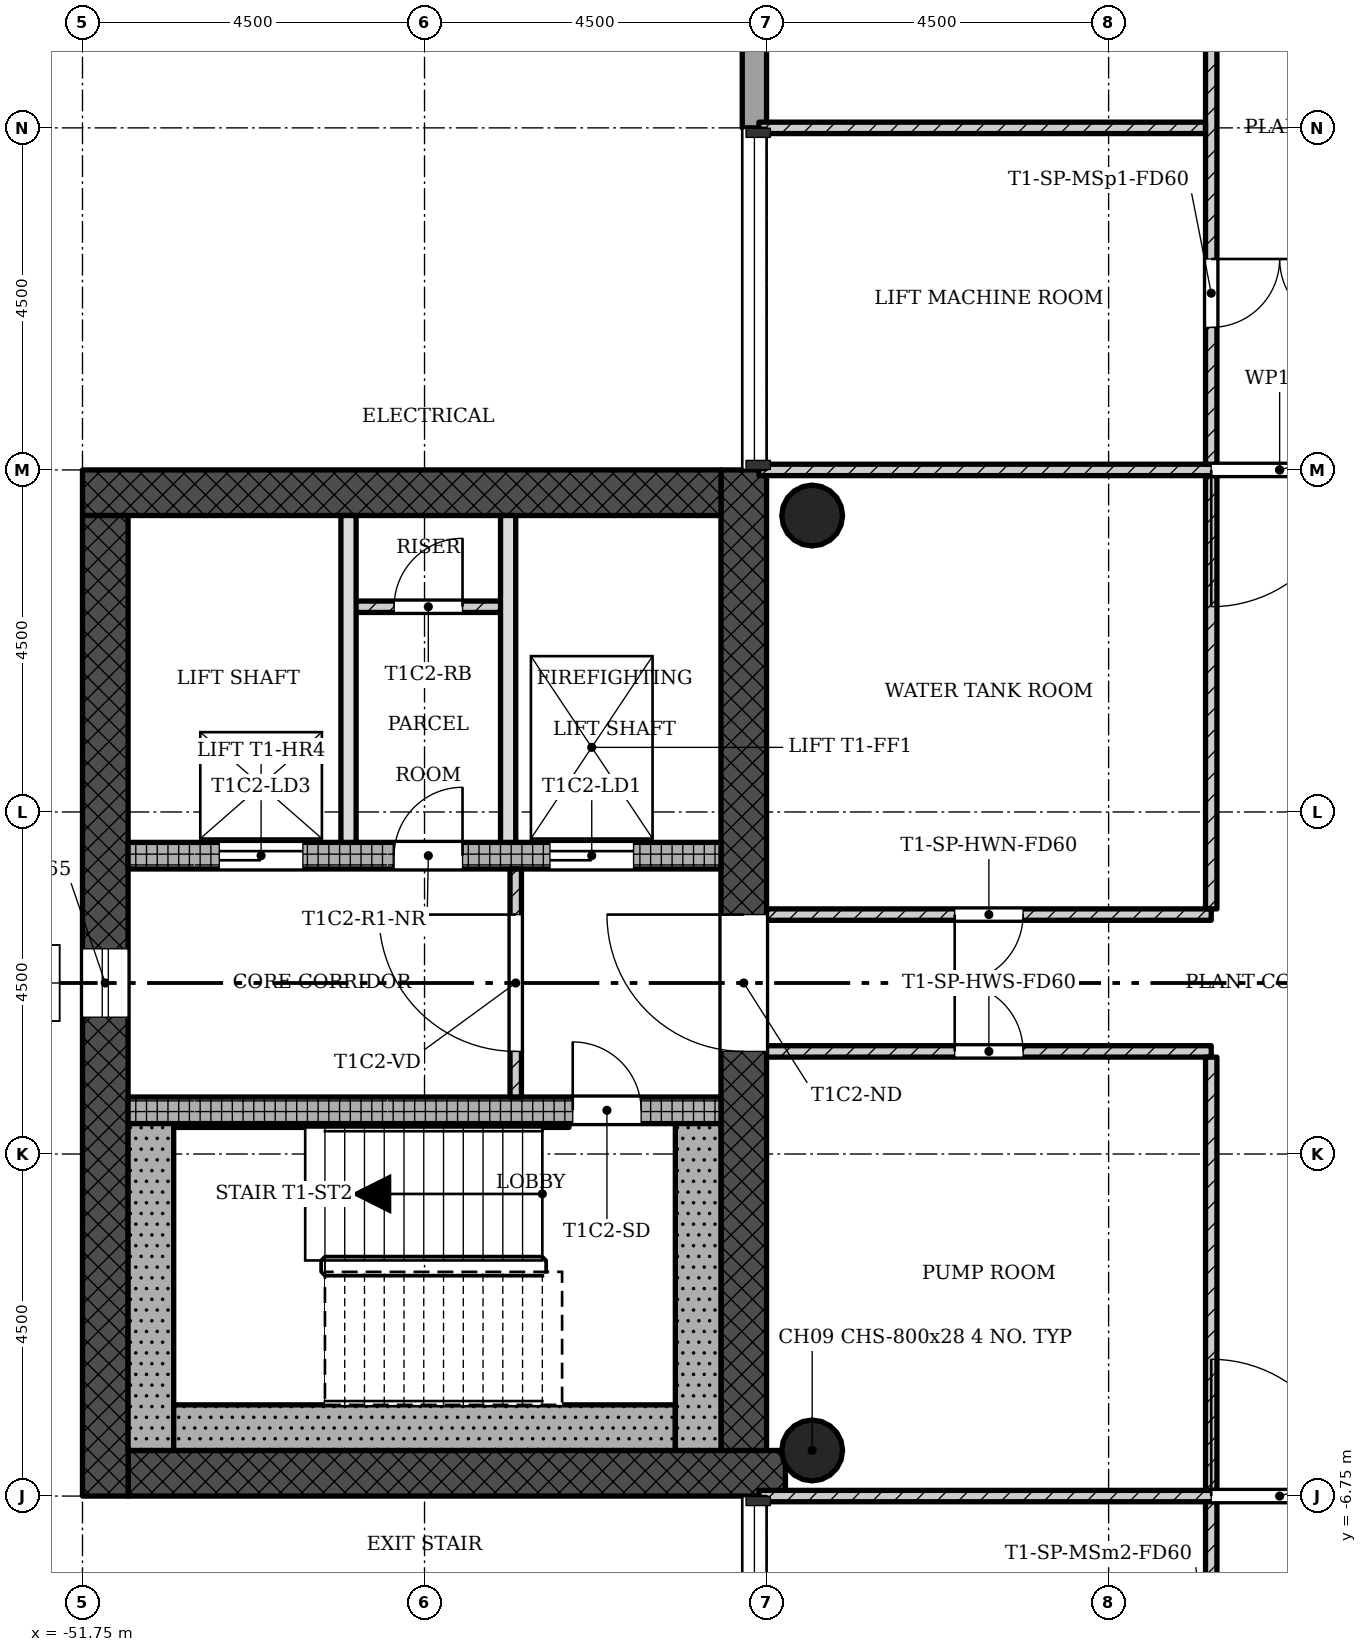
"""IFC4 building model, lengths in metres.
Left out: names, types, materials, properties, quantities, classifications, styles, units other than length and angle.
Written with IfcOpenShell. Run it as: python <this file> out.ifc"""

import sys

from ifc_helpers import new_model, si_unit, direction, frame, frame_2d, origin, origin_2d, place, context, subcontext, project, spatial, rectangle, hollow_circle, extrude, element, fill, save


model = new_model("IFC4")
c1 = context("Model", 3, precision=1e-05, world=origin(), true_north=direction((0.0, 1.0)))
c2 = subcontext(c1, "Body", "Model", "MODEL_VIEW")
j1 = project(units=[si_unit("LENGTHUNIT", "METRE"), si_unit("PLANEANGLEUNIT", "RADIAN")], contexts=[c1])
p1 = place(None, origin())
s1 = spatial("IfcSite", under=j1, at=p1, CompositionType="ELEMENT")
p2 = place(p1, origin())
s2 = spatial("IfcBuilding", under=s1, at=p2, CompositionType="ELEMENT")
p3 = place(p2, frame((0.0, 0.0, 233.4)))
s3 = spatial("IfcBuildingStorey", under=s2, at=p3, CompositionType="ELEMENT", Elevation=233.4)
p4 = place(p3, frame((-51.15, -6.45, 0.0), z_axis=(0.0, 0.0, 1.0), x_axis=(1.0, 0.0, 0.0)))
e1 = element("IfcWall", 1, at=p4, inside=s3, PredefinedType="SHEAR", context=c2, shape_type="SweptSolid", body=[
    extrude(rectangle(XDim=8.648, YDim=0.6, at=frame_2d((4.324, 0.0))), origin(), (0.0, 0.0, 1.0), 4.5),
])
p5 = place(p3, frame((-43.05, -6.15, 0.0), z_axis=(0.0, 0.0, 1.0), x_axis=(0.0, 1.0, 0.0)))
e2 = element("IfcWall", 2, at=p5, inside=s3, PredefinedType="SHEAR", context=c2, shape_type="SweptSolid", body=[
    extrude(rectangle(XDim=12.9, YDim=0.6, at=frame_2d((6.45, 0.0))), origin(), (0.0, 0.0, 1.0), 4.5),
])
p6 = place(p5, frame((5.25, 0.0, 0.0)))
e3 = element("IfcOpeningElement", 3, at=p6, cuts=e2, PredefinedType="OPENING", context=c2, shape_type="SweptSolid", body=[
    extrude(rectangle(XDim=1.8, YDim=2.1, at=frame_2d((0.9, 1.05))), frame((0.0, 0.31, 0.0), z_axis=(0.0, -1.0, 0.0), x_axis=(1.0, 0.0, 0.0)), (0.0, 0.0, 1.0), 0.62),
])
p7 = place(p3, frame((-43.35, 6.45, 0.0), z_axis=(0.0, 0.0, 1.0), x_axis=(-1.0, 0.0, 0.0)))
e4 = element("IfcWall", 4, at=p7, inside=s3, PredefinedType="SHEAR", context=c2, shape_type="SweptSolid", body=[
    extrude(rectangle(XDim=8.4, YDim=0.6, at=frame_2d((4.2, 0.0))), origin(), (0.0, 0.0, 1.0), 4.5),
])
p8 = place(p3, frame((-51.45, 6.15, 0.0), z_axis=(0.0, 0.0, 1.0), x_axis=(0.0, -1.0, 0.0)))
e5 = element("IfcWall", 5, at=p8, inside=s3, PredefinedType="SHEAR", context=c2, shape_type="SweptSolid", body=[
    extrude(rectangle(XDim=12.9, YDim=0.6, at=frame_2d((6.45, 0.0))), origin(), (0.0, 0.0, 1.0), 4.5),
])
p9 = place(p8, frame((5.7, 0.0, 0.45)))
e6 = element("IfcOpeningElement", 6, at=p9, cuts=e5, PredefinedType="OPENING", context=c2, shape_type="SweptSolid", body=[
    extrude(rectangle(XDim=0.9, YDim=2.4, at=frame_2d((0.45, 1.2))), frame((0.0, 0.31, 0.0), z_axis=(0.0, -1.0, 0.0), x_axis=(1.0, 0.0, 0.0)), (0.0, 0.0, 1.0), 0.62),
])
p10 = place(p3, frame((-51.15, -1.675, 0.0), z_axis=(0.0, 0.0, 1.0), x_axis=(1.0, 0.0, 0.0)))
e7 = element("IfcWall", 7, at=p10, inside=s3, PredefinedType="SHEAR", context=c2, shape_type="SweptSolid", body=[
    extrude(rectangle(XDim=7.8, YDim=0.35, at=frame_2d((3.9, 0.0))), origin(), (0.0, 0.0, 1.0), 4.5),
])
p11 = place(p10, frame((5.85, 0.0, 0.0)))
e8 = element("IfcOpeningElement", 8, at=p11, cuts=e7, PredefinedType="OPENING", context=c2, shape_type="SweptSolid", body=[
    extrude(rectangle(XDim=0.9, YDim=2.1, at=frame_2d((0.45, 1.05))), frame((0.0, 0.185, 0.0), z_axis=(0.0, -1.0, 0.0), x_axis=(1.0, 0.0, 0.0)), (0.0, 0.0, 1.0), 0.37),
])
p12 = place(p3, frame((-51.15, 1.675, 0.0), z_axis=(0.0, 0.0, 1.0), x_axis=(1.0, 0.0, 0.0)))
e9 = element("IfcWall", 9, at=p12, inside=s3, PredefinedType="SHEAR", context=c2, shape_type="SweptSolid", body=[
    extrude(rectangle(XDim=7.8, YDim=0.35, at=frame_2d((3.9, 0.0))), origin(), (0.0, 0.0, 1.0), 4.5),
])
p13 = place(p12, frame((5.55, 0.0, 0.0)))
e10 = element("IfcOpeningElement", 10, at=p13, cuts=e9, PredefinedType="OPENING", context=c2, shape_type="SweptSolid", body=[
    extrude(rectangle(XDim=1.1, YDim=2.1, at=frame_2d((0.55, 1.05))), frame((0.0, 0.185, 0.0), z_axis=(0.0, -1.0, 0.0), x_axis=(1.0, 0.0, 0.0)), (0.0, 0.0, 1.0), 0.37),
])
p14 = place(p12, frame((1.2, 0.0, 0.0)))
e11 = element("IfcOpeningElement", 11, at=p14, cuts=e9, PredefinedType="OPENING", context=c2, shape_type="SweptSolid", body=[
    extrude(rectangle(XDim=1.1, YDim=2.1, at=frame_2d((0.55, 1.05))), frame((0.0, 0.185, 0.0), z_axis=(0.0, -1.0, 0.0), x_axis=(1.0, 0.0, 0.0)), (0.0, 0.0, 1.0), 0.37),
])
p15 = place(p12, frame((3.5, 0.0, 0.0)))
e12 = element("IfcOpeningElement", 12, at=p15, cuts=e9, PredefinedType="OPENING", context=c2, shape_type="SweptSolid", body=[
    extrude(rectangle(XDim=0.9, YDim=2.1, at=frame_2d((0.45, 1.05))), frame((0.0, 0.185, 0.0), z_axis=(0.0, -1.0, 0.0), x_axis=(1.0, 0.0, 0.0)), (0.0, 0.0, 1.0), 0.37),
])
for number, where, z_axis, x_axis in (
    (13, (-42.15, -6.15, 0.0), (0.0, 0.0, 1.0), (1.0, 0.0, 0.0)),
    (14, (-42.15, 6.15, 0.0), (0.0, 0.0, 1.0), (1.0, 0.0, 0.0)),
):
    element("IfcColumn", number, at=place(p3, frame(where, z_axis=z_axis, x_axis=x_axis)), inside=s3, PredefinedType="COLUMN", context=c2, shape_type="SweptSolid", body=[
        extrude(hollow_circle(Radius=0.4, WallThickness=0.028, at=origin_2d()), origin(), (0.0, 0.0, 1.0), 4.5),
    ])
p16 = place(p3, frame((-42.91, 12.75, -0.3), z_axis=(0.0, 0.0, 1.0), x_axis=(0.0, -1.0, 0.0)))
e15 = element("IfcWall", 15, at=p16, inside=s3, PredefinedType="STANDARD", context=c2, shape_type="SweptSolid", body=[
    extrude(rectangle(XDim=1.5, YDim=0.32, at=frame_2d((0.75, 0.0))), origin(), (0.0, 0.0, 1.0), 4.5),
])
p17 = place(p3, frame((-46.05, 1.5, 0.0), z_axis=(0.0, 0.0, 1.0), x_axis=(0.0, -1.0, 0.0)))
e16 = element("IfcWall", 16, at=p17, inside=s3, PredefinedType="PARTITIONING", context=c2, shape_type="SweptSolid", body=[
    extrude(rectangle(XDim=3.0, YDim=0.15, at=frame_2d((1.5, 0.0))), origin(), (0.0, 0.0, 1.0), 4.1),
])
p18 = place(p17, frame((0.6, 0.0, 0.0)))
e17 = element("IfcOpeningElement", 17, at=p18, cuts=e16, PredefinedType="OPENING", context=c2, shape_type="SweptSolid", body=[
    extrude(rectangle(XDim=1.8, YDim=2.1, at=frame_2d((0.9, 1.05))), frame((0.0, 0.085, 0.0), z_axis=(0.0, -1.0, 0.0), x_axis=(1.0, 0.0, 0.0)), (0.0, 0.0, 1.0), 0.17),
])
for number, where, z_axis, x_axis in (
    (18, (-48.25, 6.15, 0.0), (0.0, 0.0, 1.0), (0.0, -1.0, 0.0)),
    (19, (-46.15, 6.15, 0.0), (0.0, 0.0, 1.0), (0.0, -1.0, 0.0)),
):
    element("IfcWall", number, at=place(p3, frame(where, z_axis=z_axis, x_axis=x_axis)), inside=s3, PredefinedType="SOLIDWALL", context=c2, shape_type="SweptSolid", body=[
        extrude(rectangle(XDim=4.3, YDim=0.2, at=frame_2d((2.15, 0.0))), origin(), (0.0, 0.0, 1.0), 4.1),
    ])
p19 = place(p3, frame((-46.15, 4.95, 0.0), z_axis=(0.0, 0.0, 1.0), x_axis=(-1.0, 0.0, 0.0)))
e20 = element("IfcWall", 20, at=p19, inside=s3, PredefinedType="PARTITIONING", context=c2, shape_type="SweptSolid", body=[
    extrude(rectangle(XDim=2.1, YDim=0.15, at=frame_2d((1.05, 0.0))), origin(), (0.0, 0.0, 1.0), 4.1),
])
p20 = place(p19, frame((0.6, 0.0, 0.0)))
e21 = element("IfcOpeningElement", 21, at=p20, cuts=e20, PredefinedType="OPENING", context=c2, shape_type="SweptSolid", body=[
    extrude(rectangle(XDim=0.9, YDim=2.1, at=frame_2d((0.45, 1.05))), frame((0.0, 0.085, 0.0), z_axis=(0.0, -1.0, 0.0), x_axis=(1.0, 0.0, 0.0)), (0.0, 0.0, 1.0), 0.17),
])
p21 = place(p3, frame((-42.75, 0.9, 0.0), z_axis=(0.0, 0.0, 1.0), x_axis=(1.0, 0.0, 0.0)))
e22 = element("IfcWall", 22, at=p21, inside=s3, PredefinedType="PARTITIONING", context=c2, shape_type="SweptSolid", body=[
    extrude(rectangle(XDim=5.85, YDim=0.15, at=frame_2d((2.925, 0.0))), origin(), (0.0, 0.0, 1.0), 4.1),
])
p22 = place(p21, frame((2.475, 0.0, 0.0)))
e23 = element("IfcOpeningElement", 23, at=p22, cuts=e22, PredefinedType="OPENING", context=c2, shape_type="SweptSolid", body=[
    extrude(rectangle(XDim=0.9, YDim=2.1, at=frame_2d((0.45, 1.05))), frame((0.0, 0.085, 0.0), z_axis=(0.0, -1.0, 0.0), x_axis=(1.0, 0.0, 0.0)), (0.0, 0.0, 1.0), 0.17),
])
p23 = place(p3, frame((-36.9, 0.975, 0.0), z_axis=(0.0, 0.0, 1.0), x_axis=(0.0, 1.0, 0.0)))
e24 = element("IfcWall", 24, at=p23, inside=s3, PredefinedType="PARTITIONING", context=c2, shape_type="SweptSolid", body=[
    extrude(rectangle(XDim=5.7, YDim=0.15, at=frame_2d((2.85, 0.0))), origin(), (0.0, 0.0, 1.0), 4.1),
])
p24 = place(p3, frame((-42.75, -0.9, 0.0), z_axis=(0.0, 0.0, 1.0), x_axis=(1.0, 0.0, 0.0)))
e25 = element("IfcWall", 25, at=p24, inside=s3, PredefinedType="PARTITIONING", context=c2, shape_type="SweptSolid", body=[
    extrude(rectangle(XDim=5.85, YDim=0.15, at=frame_2d((2.925, 0.0))), origin(), (0.0, 0.0, 1.0), 4.1),
])
p25 = place(p24, frame((2.475, 0.0, 0.0)))
e26 = element("IfcOpeningElement", 26, at=p25, cuts=e25, PredefinedType="OPENING", context=c2, shape_type="SweptSolid", body=[
    extrude(rectangle(XDim=0.9, YDim=2.1, at=frame_2d((0.45, 1.05))), frame((0.0, 0.085, 0.0), z_axis=(0.0, -1.0, 0.0), x_axis=(1.0, 0.0, 0.0)), (0.0, 0.0, 1.0), 0.17),
])
p26 = place(p3, frame((-36.9, -6.675, 0.0), z_axis=(0.0, 0.0, 1.0), x_axis=(0.0, 1.0, 0.0)))
e27 = element("IfcWall", 27, at=p26, inside=s3, PredefinedType="PARTITIONING", context=c2, shape_type="SweptSolid", body=[
    extrude(rectangle(XDim=5.7, YDim=0.15, at=frame_2d((2.85, 0.0))), origin(), (0.0, 0.0, 1.0), 4.1),
])
p27 = place(p3, frame((-42.85, 6.75, 0.0), z_axis=(0.0, 0.0, 1.0), x_axis=(1.0, 0.0, 0.0)))
e28 = element("IfcWall", 28, at=p27, inside=s3, PredefinedType="PARTITIONING", context=c2, shape_type="SweptSolid", body=[
    extrude(rectangle(XDim=13.7, YDim=0.15, at=frame_2d((6.85, 0.0))), origin(), (0.0, 0.0, 1.0), 4.1),
])
p28 = place(p27, frame((5.95, 0.0, 0.0)))
e29 = element("IfcOpeningElement", 29, at=p28, cuts=e28, PredefinedType="OPENING", context=c2, shape_type="SweptSolid", body=[
    extrude(rectangle(XDim=1.8, YDim=2.1, at=frame_2d((0.9, 1.05))), frame((0.0, 0.085, 0.0), z_axis=(0.0, -1.0, 0.0), x_axis=(1.0, 0.0, 0.0)), (0.0, 0.0, 1.0), 0.17),
])
p29 = place(p3, frame((-36.9, 6.825, 0.0), z_axis=(0.0, 0.0, 1.0), x_axis=(0.0, 1.0, 0.0)))
e30 = element("IfcWall", 30, at=p29, inside=s3, PredefinedType="PARTITIONING", context=c2, shape_type="SweptSolid", body=[
    extrude(rectangle(XDim=9.025, YDim=0.15, at=frame_2d((4.513, 0.0))), origin(), (0.0, 0.0, 1.0), 4.1),
])
p30 = place(p29, frame((1.8, 0.0, 0.0)))
e31 = element("IfcOpeningElement", 31, at=p30, cuts=e30, PredefinedType="OPENING", context=c2, shape_type="SweptSolid", body=[
    extrude(rectangle(XDim=0.9, YDim=2.1, at=frame_2d((0.45, 1.05))), frame((0.0, 0.085, 0.0), z_axis=(0.0, -1.0, 0.0), x_axis=(1.0, 0.0, 0.0)), (0.0, 0.0, 1.0), 0.17),
])
p31 = place(p29, frame((6.3, 0.0, 0.0)))
e32 = element("IfcOpeningElement", 32, at=p31, cuts=e30, PredefinedType="OPENING", context=c2, shape_type="SweptSolid", body=[
    extrude(rectangle(XDim=0.9, YDim=2.1, at=frame_2d((0.45, 1.05))), frame((0.0, 0.085, 0.0), z_axis=(0.0, -1.0, 0.0), x_axis=(1.0, 0.0, 0.0)), (0.0, 0.0, 1.0), 0.17),
])
p32 = place(p3, frame((-36.975, 11.25, 0.0), z_axis=(0.0, 0.0, 1.0), x_axis=(-1.0, 0.0, 0.0)))
e33 = element("IfcWall", 33, at=p32, inside=s3, PredefinedType="PARTITIONING", context=c2, shape_type="SweptSolid", body=[
    extrude(rectangle(XDim=5.875, YDim=0.15, at=frame_2d((2.938, 0.0))), origin(), (0.0, 0.0, 1.0), 4.1),
])
p33 = place(p3, frame((-42.85, -6.75, 0.0), z_axis=(0.0, 0.0, 1.0), x_axis=(1.0, 0.0, 0.0)))
e34 = element("IfcWall", 34, at=p33, inside=s3, PredefinedType="PARTITIONING", context=c2, shape_type="SweptSolid", body=[
    extrude(rectangle(XDim=13.7, YDim=0.15, at=frame_2d((6.85, 0.0))), origin(), (0.0, 0.0, 1.0), 4.1),
])
p34 = place(p33, frame((5.95, 0.0, 0.0)))
e35 = element("IfcOpeningElement", 35, at=p34, cuts=e34, PredefinedType="OPENING", context=c2, shape_type="SweptSolid", body=[
    extrude(rectangle(XDim=1.8, YDim=2.1, at=frame_2d((0.9, 1.05))), frame((0.0, 0.085, 0.0), z_axis=(0.0, -1.0, 0.0), x_axis=(1.0, 0.0, 0.0)), (0.0, 0.0, 1.0), 0.17),
])
p35 = place(p3, frame((-36.9, -15.85, 0.0), z_axis=(0.0, 0.0, 1.0), x_axis=(0.0, 1.0, 0.0)))
e36 = element("IfcWall", 36, at=p35, inside=s3, PredefinedType="PARTITIONING", context=c2, shape_type="SweptSolid", body=[
    extrude(rectangle(XDim=9.025, YDim=0.15, at=frame_2d((4.513, 0.0))), origin(), (0.0, 0.0, 1.0), 4.1),
])
p36 = place(p35, frame((1.9, 0.0, 0.0)))
e37 = element("IfcOpeningElement", 37, at=p36, cuts=e36, PredefinedType="OPENING", context=c2, shape_type="SweptSolid", body=[
    extrude(rectangle(XDim=0.9, YDim=2.1, at=frame_2d((0.45, 1.05))), frame((0.0, 0.085, 0.0), z_axis=(0.0, -1.0, 0.0), x_axis=(1.0, 0.0, 0.0)), (0.0, 0.0, 1.0), 0.17),
])
p37 = place(p35, frame((6.4, 0.0, 0.0)))
e38 = element("IfcOpeningElement", 38, at=p37, cuts=e36, PredefinedType="OPENING", context=c2, shape_type="SweptSolid", body=[
    extrude(rectangle(XDim=0.9, YDim=2.1, at=frame_2d((0.45, 1.05))), frame((0.0, 0.085, 0.0), z_axis=(0.0, -1.0, 0.0), x_axis=(1.0, 0.0, 0.0)), (0.0, 0.0, 1.0), 0.17),
])
p38 = place(p3, frame((-50.85, -1.85, 0.0), z_axis=(0.0, 0.0, 1.0), x_axis=(0.0, -1.0, 0.0)))
e39 = element("IfcWall", 39, at=p38, inside=s3, PredefinedType="SHEAR", context=c2, shape_type="SweptSolid", body=[
    extrude(rectangle(XDim=4.3, YDim=0.6, at=frame_2d((2.15, 0.0))), origin(), (0.0, 0.0, 1.0), 4.5),
])
p39 = place(p3, frame((-43.95, -5.85, 0.0), z_axis=(0.0, 0.0, 1.0), x_axis=(-1.0, 0.0, 0.0)))
e40 = element("IfcWall", 40, at=p39, inside=s3, PredefinedType="SHEAR", context=c2, shape_type="SweptSolid", body=[
    extrude(rectangle(XDim=6.6, YDim=0.6, at=frame_2d((3.3, 0.0))), origin(), (0.0, 0.0, 1.0), 4.5),
])
p40 = place(p3, frame((-43.65, -1.85, 0.0), z_axis=(0.0, 0.0, 1.0), x_axis=(0.0, -1.0, 0.0)))
e41 = element("IfcWall", 41, at=p40, inside=s3, PredefinedType="SHEAR", context=c2, shape_type="SweptSolid", body=[
    extrude(rectangle(XDim=4.3, YDim=0.6, at=frame_2d((2.15, 0.0))), origin(), (0.0, 0.0, 1.0), 4.5),
])
p41 = place(p3, frame((-45.35, -1.875, 0.0), z_axis=(0.0, 0.0, 1.0), x_axis=(-1.0, 0.0, 0.0)))
e42 = element("IfcWall", 42, at=p41, inside=s3, PredefinedType="SHEAR", context=c2, shape_type="SweptSolid", body=[
    extrude(rectangle(XDim=5.2, YDim=0.05, at=frame_2d((2.6, 0.0))), origin(), (0.0, 0.0, 1.0), 4.5),
])
p42 = place(p9, origin())
e43 = element("IfcWindow", 43, at=p42, inside=s3, PartitioningType="SINGLE_PANEL", PredefinedType="WINDOW", context=c2, shape_type="SweptSolid", body=[
    extrude(rectangle(XDim=0.9, YDim=2.4, at=frame_2d((0.45, 1.2))), frame((0.0, 0.03, 0.0), z_axis=(0.0, -1.0, 0.0), x_axis=(1.0, 0.0, 0.0)), (0.0, 0.0, 1.0), 0.06),
])
fill(e6, e43)
p43 = place(p18, origin())
e44 = element("IfcDoor", 44, at=p43, inside=s3, OperationType="SINGLE_SWING_LEFT", PredefinedType="DOOR", context=c2, shape_type="SweptSolid", body=[
    extrude(rectangle(XDim=1.8, YDim=2.1, at=frame_2d((0.9, 1.05))), frame((0.0, 0.025, 0.0), z_axis=(0.0, -1.0, 0.0), x_axis=(1.0, 0.0, 0.0)), (0.0, 0.0, 1.0), 0.05),
])
fill(e17, e44)
p44 = place(p20, origin())
e45 = element("IfcDoor", 45, at=p44, inside=s3, OperationType="SINGLE_SWING_LEFT", PredefinedType="DOOR", context=c2, shape_type="SweptSolid", body=[
    extrude(rectangle(XDim=0.9, YDim=2.1, at=frame_2d((0.45, 1.05))), frame((0.0, 0.025, 0.0), z_axis=(0.0, -1.0, 0.0), x_axis=(1.0, 0.0, 0.0)), (0.0, 0.0, 1.0), 0.05),
])
fill(e21, e45)
p45 = place(p22, origin())
e46 = element("IfcDoor", 46, at=p45, inside=s3, OperationType="SINGLE_SWING_LEFT", PredefinedType="DOOR", context=c2, shape_type="SweptSolid", body=[
    extrude(rectangle(XDim=0.9, YDim=2.1, at=frame_2d((0.45, 1.05))), frame((0.0, 0.025, 0.0), z_axis=(0.0, -1.0, 0.0), x_axis=(1.0, 0.0, 0.0)), (0.0, 0.0, 1.0), 0.05),
])
fill(e23, e46)
p46 = place(p25, origin())
e47 = element("IfcDoor", 47, at=p46, inside=s3, OperationType="SINGLE_SWING_RIGHT", PredefinedType="DOOR", context=c2, shape_type="SweptSolid", body=[
    extrude(rectangle(XDim=0.9, YDim=2.1, at=frame_2d((0.45, 1.05))), frame((0.0, 0.025, 0.0), z_axis=(0.0, -1.0, 0.0), x_axis=(1.0, 0.0, 0.0)), (0.0, 0.0, 1.0), 0.05),
])
fill(e26, e47)
p47 = place(p28, origin())
e48 = element("IfcDoor", 48, at=p47, inside=s3, OperationType="SINGLE_SWING_LEFT", PredefinedType="DOOR", context=c2, shape_type="SweptSolid", body=[
    extrude(rectangle(XDim=1.8, YDim=2.1, at=frame_2d((0.9, 1.05))), frame((0.0, 0.025, 0.0), z_axis=(0.0, -1.0, 0.0), x_axis=(1.0, 0.0, 0.0)), (0.0, 0.0, 1.0), 0.05),
])
fill(e29, e48)
p48 = place(p30, origin())
e49 = element("IfcDoor", 49, at=p48, inside=s3, OperationType="SINGLE_SWING_RIGHT", PredefinedType="DOOR", context=c2, shape_type="SweptSolid", body=[
    extrude(rectangle(XDim=0.9, YDim=2.1, at=frame_2d((0.45, 1.05))), frame((0.0, 0.025, 0.0), z_axis=(0.0, -1.0, 0.0), x_axis=(1.0, 0.0, 0.0)), (0.0, 0.0, 1.0), 0.05),
])
fill(e31, e49)
p49 = place(p34, origin())
e50 = element("IfcDoor", 50, at=p49, inside=s3, OperationType="SINGLE_SWING_RIGHT", PredefinedType="DOOR", context=c2, shape_type="SweptSolid", body=[
    extrude(rectangle(XDim=1.8, YDim=2.1, at=frame_2d((0.9, 1.05))), frame((0.0, 0.025, 0.0), z_axis=(0.0, -1.0, 0.0), x_axis=(1.0, 0.0, 0.0)), (0.0, 0.0, 1.0), 0.05),
])
fill(e35, e50)
p50 = place(p11, origin())
e51 = element("IfcDoor", 51, at=p50, inside=s3, OperationType="SINGLE_SWING_RIGHT", PredefinedType="DOOR", context=c2, shape_type="SweptSolid", body=[
    extrude(rectangle(XDim=0.9, YDim=2.1, at=frame_2d((0.45, 1.05))), frame((0.0, 0.025, 0.0), z_axis=(0.0, -1.0, 0.0), x_axis=(1.0, 0.0, 0.0)), (0.0, 0.0, 1.0), 0.05),
])
fill(e8, e51)
p51 = place(p13, origin())
e52 = element("IfcDoor", 52, at=p51, inside=s3, OperationType="SLIDING_TO_LEFT", PredefinedType="DOOR", context=c2, shape_type="SweptSolid", body=[
    extrude(rectangle(XDim=1.1, YDim=2.1, at=frame_2d((0.55, 1.05))), frame((0.0, 0.025, 0.0), z_axis=(0.0, -1.0, 0.0), x_axis=(1.0, 0.0, 0.0)), (0.0, 0.0, 1.0), 0.05),
])
fill(e10, e52)
p52 = place(p14, origin())
e53 = element("IfcDoor", 53, at=p52, inside=s3, OperationType="SLIDING_TO_LEFT", PredefinedType="DOOR", context=c2, shape_type="SweptSolid", body=[
    extrude(rectangle(XDim=1.1, YDim=2.1, at=frame_2d((0.55, 1.05))), frame((0.0, 0.025, 0.0), z_axis=(0.0, -1.0, 0.0), x_axis=(1.0, 0.0, 0.0)), (0.0, 0.0, 1.0), 0.05),
])
fill(e11, e53)
p53 = place(p15, origin())
e54 = element("IfcDoor", 54, at=p53, inside=s3, OperationType="SINGLE_SWING_LEFT", PredefinedType="DOOR", context=c2, shape_type="SweptSolid", body=[
    extrude(rectangle(XDim=0.9, YDim=2.1, at=frame_2d((0.45, 1.05))), frame((0.0, 0.025, 0.0), z_axis=(0.0, -1.0, 0.0), x_axis=(1.0, 0.0, 0.0)), (0.0, 0.0, 1.0), 0.05),
])
fill(e12, e54)
p54 = place(p6, origin())
e55 = element("IfcDoor", 55, at=p54, inside=s3, OperationType="SINGLE_SWING_LEFT", PredefinedType="DOOR", context=c2, shape_type="SweptSolid", body=[
    extrude(rectangle(XDim=1.8, YDim=2.1, at=frame_2d((0.9, 1.05))), frame((0.0, 0.025, 0.0), z_axis=(0.0, -1.0, 0.0), x_axis=(1.0, 0.0, 0.0)), (0.0, 0.0, 1.0), 0.05),
])
fill(e3, e55)
save(model, sys.argv[1])
